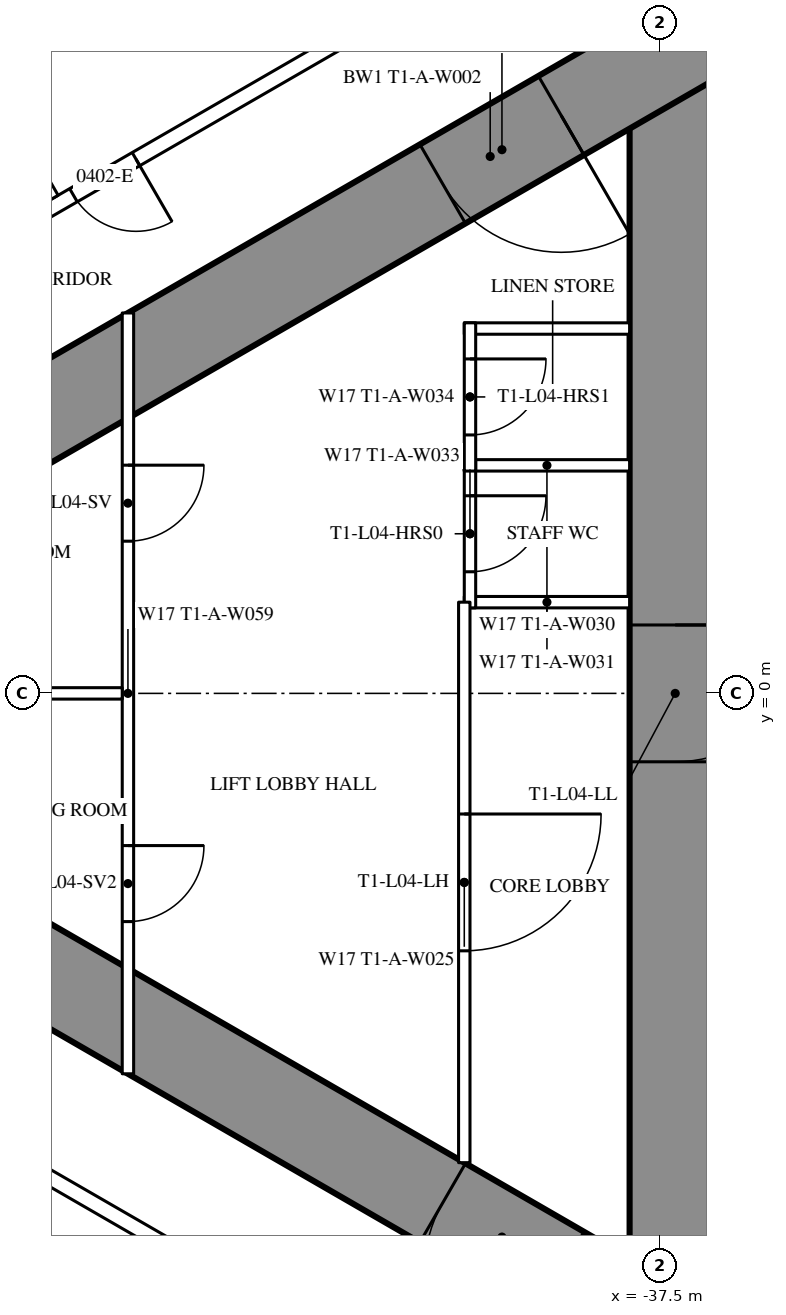
"""IFC4 building model, lengths in metres.
Left out: names, types, materials, properties, quantities, classifications, styles, units other than length and angle.
Written with IfcOpenShell. Run it as: python <this file> out.ifc"""

import sys

from ifc_helpers import new_model, si_unit, direction, frame, frame_2d, origin, place, context, subcontext, project, spatial, rectangle, extrude, element, fill, save


model = new_model("IFC4")
c1 = context("Model", 3, precision=1e-05, world=origin(), true_north=direction((0.0, 1.0)))
c2 = subcontext(c1, "Body", "Model", "MODEL_VIEW")
j1 = project(units=[si_unit("LENGTHUNIT", "METRE"), si_unit("PLANEANGLEUNIT", "RADIAN")], contexts=[c1])
p1 = place(None, origin())
s1 = spatial("IfcSite", under=j1, at=p1, CompositionType="ELEMENT")
p2 = place(p1, origin())
s2 = spatial("IfcBuilding", under=s1, at=p2, CompositionType="ELEMENT")
p3 = place(p2, frame((0.0, 0.0, 21.5)))
s3 = spatial("IfcBuildingStorey", under=s2, at=p3, CompositionType="ELEMENT", Elevation=21.5)
p4 = place(p3, frame((-37.3, 8.6, 0.0), z_axis=(0.0, 0.0, 1.0), x_axis=(0.0, -1.0, 0.0)))
e1 = element("IfcWall", 1, at=p4, inside=s3, PredefinedType="SHEAR", context=c2, shape_type="SweptSolid", body=[
    extrude(rectangle(XDim=17.2, YDim=1.2, at=frame_2d((8.6, 0.0))), origin(), (0.0, 0.0, 1.0), 3.5),
])
p5 = place(p4, frame((7.7, 0.0, 0.0)))
e2 = element("IfcOpeningElement", 2, at=p5, cuts=e1, PredefinedType="OPENING", context=c2, shape_type="SweptSolid", body=[
    extrude(rectangle(XDim=1.8, YDim=2.2, at=frame_2d((0.9, 1.1))), frame((0.0, 0.61, 0.0), z_axis=(0.0, -1.0, 0.0), x_axis=(1.0, 0.0, 0.0)), (0.0, 0.0, 1.0), 1.22),
])
p6 = place(p3, frame((-27.2, 14.3, 0.0), z_axis=(0.0, 0.0, 1.0), x_axis=(-0.866026593062, -0.499997940104, 0.0)))
e3 = element("IfcWall", 3, at=p6, inside=s3, PredefinedType="SHEAR", context=c2, shape_type="SweptSolid", body=[
    extrude(rectangle(XDim=28.946, YDim=1.2, at=frame_2d((14.473, 0.0))), origin(), (0.0, 0.0, 1.0), 3.5),
])
p7 = place(p6, frame((4.6, 0.0, 0.0)))
e4 = element("IfcOpeningElement", 4, at=p7, cuts=e3, PredefinedType="OPENING", context=c2, shape_type="SweptSolid", body=[
    extrude(rectangle(XDim=1.0, YDim=2.2, at=frame_2d((0.5, 1.1))), frame((0.0, 0.61, 0.0), z_axis=(0.0, -1.0, 0.0), x_axis=(1.0, 0.0, 0.0)), (0.0, 0.0, 1.0), 1.22),
])
p8 = place(p6, frame((13.395, 0.0, 0.0)))
e5 = element("IfcOpeningElement", 5, at=p8, cuts=e3, PredefinedType="OPENING", context=c2, shape_type="SweptSolid", body=[
    extrude(rectangle(XDim=1.8, YDim=2.2, at=frame_2d((0.9, 1.1))), frame((0.0, 0.61, 0.0), z_axis=(0.0, -1.0, 0.0), x_axis=(1.0, 0.0, 0.0)), (0.0, 0.0, 1.0), 1.22),
])
p9 = place(p3, frame((-27.2, -14.3, 0.0), z_axis=(0.0, 0.0, 1.0), x_axis=(-0.866024021859, 0.500002393557, 0.0)))
e6 = element("IfcWall", 6, at=p9, inside=s3, PredefinedType="SHEAR", context=c2, shape_type="SweptSolid", body=[
    extrude(rectangle(XDim=27.907, YDim=1.2, at=frame_2d((13.954, 0.0))), origin(), (0.0, 0.0, 1.0), 3.5),
])
p10 = place(p9, frame((4.6, 0.0, 0.0)))
e7 = element("IfcOpeningElement", 7, at=p10, cuts=e6, PredefinedType="OPENING", context=c2, shape_type="SweptSolid", body=[
    extrude(rectangle(XDim=1.0, YDim=2.2, at=frame_2d((0.5, 1.1))), frame((0.0, 0.61, 0.0), z_axis=(0.0, -1.0, 0.0), x_axis=(1.0, 0.0, 0.0)), (0.0, 0.0, 1.0), 1.22),
])
p11 = place(p9, frame((13.395, 0.0, 0.0)))
e8 = element("IfcOpeningElement", 8, at=p11, cuts=e6, PredefinedType="OPENING", context=c2, shape_type="SweptSolid", body=[
    extrude(rectangle(XDim=1.8, YDim=2.2, at=frame_2d((0.9, 1.1))), frame((0.0, 0.61, 0.0), z_axis=(0.0, -1.0, 0.0), x_axis=(1.0, 0.0, 0.0)), (0.0, 0.0, 1.0), 1.22),
])
p12 = place(p3, frame((-37.7, 10.894, 0.0), z_axis=(0.0, 0.0, 1.0), x_axis=(-0.866027905338, -0.499995667157, 0.0)))
e9 = element("IfcWall", 9, at=p12, inside=s3, PredefinedType="PARTITIONING", context=c2, shape_type="SweptSolid", body=[
    extrude(rectangle(XDim=21.787, YDim=0.2, at=frame_2d((10.894, 0.0))), origin(), (0.0, 0.0, 1.0), 3.25),
])
p13 = place(p12, frame((11.78, 0.0, 0.0)))
e10 = element("IfcOpeningElement", 10, at=p13, cuts=e9, PredefinedType="OPENING", context=c2, shape_type="SweptSolid", body=[
    extrude(rectangle(XDim=0.95, YDim=2.2, at=frame_2d((0.475, 1.1))), frame((0.0, 0.11, 0.0), z_axis=(0.0, -1.0, 0.0), x_axis=(1.0, 0.0, 0.0)), (0.0, 0.0, 1.0), 0.22),
])
p14 = place(p12, frame((7.73, 0.0, 0.0)))
e11 = element("IfcOpeningElement", 11, at=p14, cuts=e9, PredefinedType="OPENING", context=c2, shape_type="SweptSolid", body=[
    extrude(rectangle(XDim=0.95, YDim=2.2, at=frame_2d((0.475, 1.1))), frame((0.0, 0.11, 0.0), z_axis=(0.0, -1.0, 0.0), x_axis=(1.0, 0.0, 0.0)), (0.0, 0.0, 1.0), 0.22),
])
p15 = place(p3, frame((-36.92, -11.344, 0.0), z_axis=(0.0, 0.0, 1.0), x_axis=(-0.866028313256, 0.499994960614, 0.0)))
e12 = element("IfcWall", 12, at=p15, inside=s3, PredefinedType="PARTITIONING", context=c2, shape_type="SweptSolid", body=[
    extrude(rectangle(XDim=22.568, YDim=0.2, at=frame_2d((11.284, 0.0))), origin(), (0.0, 0.0, 1.0), 3.25),
])
p16 = place(p15, frame((15.03, 0.0, 0.0)))
e13 = element("IfcOpeningElement", 13, at=p16, cuts=e12, PredefinedType="OPENING", context=c2, shape_type="SweptSolid", body=[
    extrude(rectangle(XDim=0.95, YDim=2.2, at=frame_2d((0.475, 1.1))), frame((0.0, 0.11, 0.0), z_axis=(0.0, -1.0, 0.0), x_axis=(1.0, 0.0, 0.0)), (0.0, 0.0, 1.0), 0.22),
])
p17 = place(p15, frame((3.35, 0.0, 0.0)))
e14 = element("IfcOpeningElement", 14, at=p17, cuts=e12, PredefinedType="OPENING", context=c2, shape_type="SweptSolid", body=[
    extrude(rectangle(XDim=1.0, YDim=2.2, at=frame_2d((0.5, 1.1))), frame((0.0, 0.11, 0.0), z_axis=(0.0, -1.0, 0.0), x_axis=(1.0, 0.0, 0.0)), (0.0, 0.0, 1.0), 0.22),
])
p18 = place(p3, frame((-45.483, 6.515, 0.0), z_axis=(0.0, 0.0, 1.0), x_axis=(-0.500006934395, 0.866021400173, 0.0)))
e15 = element("IfcWall", 15, at=p18, inside=s3, PredefinedType="PARTITIONING", context=c2, shape_type="SweptSolid", body=[
    extrude(rectangle(XDim=2.6, YDim=0.15, at=frame_2d((1.3, 0.0))), origin(), (0.0, 0.0, 1.0), 3.25),
])
p19 = place(p18, frame((0.9, 0.0, 0.0)))
e16 = element("IfcOpeningElement", 16, at=p19, cuts=e15, PredefinedType="OPENING", context=c2, shape_type="SweptSolid", body=[
    extrude(rectangle(XDim=0.8, YDim=2.2, at=frame_2d((0.4, 1.1))), frame((0.0, 0.085, 0.0), z_axis=(0.0, -1.0, 0.0), x_axis=(1.0, 0.0, 0.0)), (0.0, 0.0, 1.0), 0.17),
])
for number, where, z_axis, x_axis in (
    (17, (-37.9, 1.2, 0.0), (0.0, 0.0, 1.0), (-1.0, 0.0, 0.0)),
    (18, (-37.9, 3.0, 0.0), (0.0, 0.0, 1.0), (-1.0, 0.0, 0.0)),
    (19, (-37.9, 4.8, 0.0), (0.0, 0.0, 1.0), (-1.0, 0.0, 0.0)),
):
    element("IfcWall", number, at=place(p3, frame(where, z_axis=z_axis, x_axis=x_axis)), inside=s3, PredefinedType="PARTITIONING", context=c2, shape_type="SweptSolid", body=[
        extrude(rectangle(XDim=2.175, YDim=0.15, at=frame_2d((1.087, 0.0))), origin(), (0.0, 0.0, 1.0), 3.25),
    ])
p20 = place(p3, frame((-40.0, 3.075, 0.0), z_axis=(0.0, 0.0, 1.0), x_axis=(0.0, -1.0, 0.0)))
e20 = element("IfcWall", 20, at=p20, inside=s3, PredefinedType="PARTITIONING", context=c2, shape_type="SweptSolid", body=[
    extrude(rectangle(XDim=1.95, YDim=0.15, at=frame_2d((0.975, 0.0))), origin(), (0.0, 0.0, 1.0), 3.25),
])
p21 = place(p20, frame((0.475, 0.0, 0.0)))
e21 = element("IfcOpeningElement", 21, at=p21, cuts=e20, PredefinedType="OPENING", context=c2, shape_type="SweptSolid", body=[
    extrude(rectangle(XDim=1.0, YDim=2.2, at=frame_2d((0.5, 1.1))), frame((0.0, 0.085, 0.0), z_axis=(0.0, -1.0, 0.0), x_axis=(1.0, 0.0, 0.0)), (0.0, 0.0, 1.0), 0.17),
])
p22 = place(p3, frame((-40.0, 4.875, 0.0), z_axis=(0.0, 0.0, 1.0), x_axis=(0.0, -1.0, 0.0)))
e22 = element("IfcWall", 22, at=p22, inside=s3, PredefinedType="PARTITIONING", context=c2, shape_type="SweptSolid", body=[
    extrude(rectangle(XDim=1.95, YDim=0.15, at=frame_2d((0.975, 0.0))), origin(), (0.0, 0.0, 1.0), 3.25),
])
p23 = place(p22, frame((0.475, 0.0, 0.0)))
e23 = element("IfcOpeningElement", 23, at=p23, cuts=e22, PredefinedType="OPENING", context=c2, shape_type="SweptSolid", body=[
    extrude(rectangle(XDim=1.0, YDim=2.2, at=frame_2d((0.5, 1.1))), frame((0.0, 0.085, 0.0), z_axis=(0.0, -1.0, 0.0), x_axis=(1.0, 0.0, 0.0)), (0.0, 0.0, 1.0), 0.17),
])
p24 = place(p3, frame((-40.075, 1.2, 0.0), z_axis=(0.0, 0.0, 1.0), x_axis=(0.0, -1.0, 0.0)))
e24 = element("IfcWall", 24, at=p24, inside=s3, PredefinedType="PARTITIONING", context=c2, shape_type="SweptSolid", body=[
    extrude(rectangle(XDim=7.374, YDim=0.15, at=frame_2d((3.687, 0.0))), origin(), (0.0, 0.0, 1.0), 3.25),
])
p25 = place(p24, frame((2.787, 0.0, 0.0)))
e25 = element("IfcOpeningElement", 25, at=p25, cuts=e24, PredefinedType="OPENING", context=c2, shape_type="SweptSolid", body=[
    extrude(rectangle(XDim=1.8, YDim=2.2, at=frame_2d((0.9, 1.1))), frame((0.0, 0.085, 0.0), z_axis=(0.0, -1.0, 0.0), x_axis=(1.0, 0.0, 0.0)), (0.0, 0.0, 1.0), 0.17),
])
p26 = place(p3, frame((-44.5, 5.005, 0.0), z_axis=(0.0, 0.0, 1.0), x_axis=(0.0, -1.0, 0.0)))
e26 = element("IfcWall", 26, at=p26, inside=s3, PredefinedType="PARTITIONING", context=c2, shape_type="SweptSolid", body=[
    extrude(rectangle(XDim=10.009, YDim=0.15, at=frame_2d((5.005, 0.0))), origin(), (0.0, 0.0, 1.0), 2.45),
])
p27 = place(p26, frame((2.002, 0.0, 0.0)))
e27 = element("IfcOpeningElement", 27, at=p27, cuts=e26, PredefinedType="OPENING", context=c2, shape_type="SweptSolid", body=[
    extrude(rectangle(XDim=1.0, YDim=2.2, at=frame_2d((0.5, 1.1))), frame((0.0, 0.085, 0.0), z_axis=(0.0, -1.0, 0.0), x_axis=(1.0, 0.0, 0.0)), (0.0, 0.0, 1.0), 0.17),
])
p28 = place(p26, frame((7.007, 0.0, 0.0)))
e28 = element("IfcOpeningElement", 28, at=p28, cuts=e26, PredefinedType="OPENING", context=c2, shape_type="SweptSolid", body=[
    extrude(rectangle(XDim=1.0, YDim=2.2, at=frame_2d((0.5, 1.1))), frame((0.0, 0.085, 0.0), z_axis=(0.0, -1.0, 0.0), x_axis=(1.0, 0.0, 0.0)), (0.0, 0.0, 1.0), 0.17),
])
p29 = place(p3, frame((-44.575, 0.0, 0.0), z_axis=(0.0, 0.0, 1.0), x_axis=(-1.0, 0.0, 0.0)))
e29 = element("IfcWall", 29, at=p29, inside=s3, PredefinedType="PARTITIONING", context=c2, shape_type="SweptSolid", body=[
    extrude(rectangle(XDim=8.593, YDim=0.15, at=frame_2d((4.297, 0.0))), origin(), (0.0, 0.0, 1.0), 2.25),
])
p30 = place(p14, origin())
e30 = element("IfcDoor", 30, at=p30, inside=s3, OperationType="SINGLE_SWING_LEFT", PredefinedType="DOOR", context=c2, shape_type="SweptSolid", body=[
    extrude(rectangle(XDim=0.95, YDim=2.2, at=frame_2d((0.475, 1.1))), frame((0.0, 0.025, 0.0), z_axis=(0.0, -1.0, 0.0), x_axis=(1.0, 0.0, 0.0)), (0.0, 0.0, 1.0), 0.05),
])
fill(e11, e30)
p31 = place(p21, origin())
e31 = element("IfcDoor", 31, at=p31, inside=s3, OperationType="SINGLE_SWING_LEFT", PredefinedType="DOOR", context=c2, shape_type="SweptSolid", body=[
    extrude(rectangle(XDim=1.0, YDim=2.2, at=frame_2d((0.5, 1.1))), frame((0.0, 0.025, 0.0), z_axis=(0.0, -1.0, 0.0), x_axis=(1.0, 0.0, 0.0)), (0.0, 0.0, 1.0), 0.05),
])
fill(e21, e31)
p32 = place(p23, origin())
e32 = element("IfcDoor", 32, at=p32, inside=s3, OperationType="SINGLE_SWING_LEFT", PredefinedType="DOOR", context=c2, shape_type="SweptSolid", body=[
    extrude(rectangle(XDim=1.0, YDim=2.2, at=frame_2d((0.5, 1.1))), frame((0.0, 0.025, 0.0), z_axis=(0.0, -1.0, 0.0), x_axis=(1.0, 0.0, 0.0)), (0.0, 0.0, 1.0), 0.05),
])
fill(e23, e32)
p33 = place(p25, origin())
e33 = element("IfcDoor", 33, at=p33, inside=s3, OperationType="DOUBLE_DOOR_SINGLE_SWING", PredefinedType="DOOR", context=c2, shape_type="SweptSolid", body=[
    extrude(rectangle(XDim=1.8, YDim=2.2, at=frame_2d((0.9, 1.1))), frame((0.0, 0.025, 0.0), z_axis=(0.0, -1.0, 0.0), x_axis=(1.0, 0.0, 0.0)), (0.0, 0.0, 1.0), 0.05),
])
fill(e25, e33)
p34 = place(p27, origin())
e34 = element("IfcDoor", 34, at=p34, inside=s3, OperationType="SINGLE_SWING_LEFT", PredefinedType="DOOR", context=c2, shape_type="SweptSolid", body=[
    extrude(rectangle(XDim=1.0, YDim=2.2, at=frame_2d((0.5, 1.1))), frame((0.0, 0.025, 0.0), z_axis=(0.0, -1.0, 0.0), x_axis=(1.0, 0.0, 0.0)), (0.0, 0.0, 1.0), 0.05),
])
fill(e27, e34)
p35 = place(p28, origin())
e35 = element("IfcDoor", 35, at=p35, inside=s3, OperationType="SINGLE_SWING_LEFT", PredefinedType="DOOR", context=c2, shape_type="SweptSolid", body=[
    extrude(rectangle(XDim=1.0, YDim=2.2, at=frame_2d((0.5, 1.1))), frame((0.0, 0.025, 0.0), z_axis=(0.0, -1.0, 0.0), x_axis=(1.0, 0.0, 0.0)), (0.0, 0.0, 1.0), 0.05),
])
fill(e28, e35)
p36 = place(p8, origin())
e36 = element("IfcDoor", 36, at=p36, inside=s3, OperationType="DOUBLE_DOOR_SINGLE_SWING", PredefinedType="DOOR", context=c2, shape_type="SweptSolid", body=[
    extrude(rectangle(XDim=1.8, YDim=2.2, at=frame_2d((0.9, 1.1))), frame((0.0, 0.025, 0.0), z_axis=(0.0, -1.0, 0.0), x_axis=(1.0, 0.0, 0.0)), (0.0, 0.0, 1.0), 0.05),
])
fill(e5, e36)
p37 = place(p11, origin())
e37 = element("IfcDoor", 37, at=p37, inside=s3, OperationType="DOUBLE_DOOR_SINGLE_SWING", PredefinedType="DOOR", context=c2, shape_type="SweptSolid", body=[
    extrude(rectangle(XDim=1.8, YDim=2.2, at=frame_2d((0.9, 1.1))), frame((0.0, 0.025, 0.0), z_axis=(0.0, -1.0, 0.0), x_axis=(1.0, 0.0, 0.0)), (0.0, 0.0, 1.0), 0.05),
])
fill(e8, e37)
p38 = place(p5, origin())
e38 = element("IfcDoor", 38, at=p38, inside=s3, OperationType="DOUBLE_DOOR_SINGLE_SWING", PredefinedType="DOOR", context=c2, shape_type="SweptSolid", body=[
    extrude(rectangle(XDim=1.8, YDim=2.2, at=frame_2d((0.9, 1.1))), frame((0.0, 0.025, 0.0), z_axis=(0.0, -1.0, 0.0), x_axis=(1.0, 0.0, 0.0)), (0.0, 0.0, 1.0), 0.05),
])
fill(e2, e38)
save(model, sys.argv[1])
